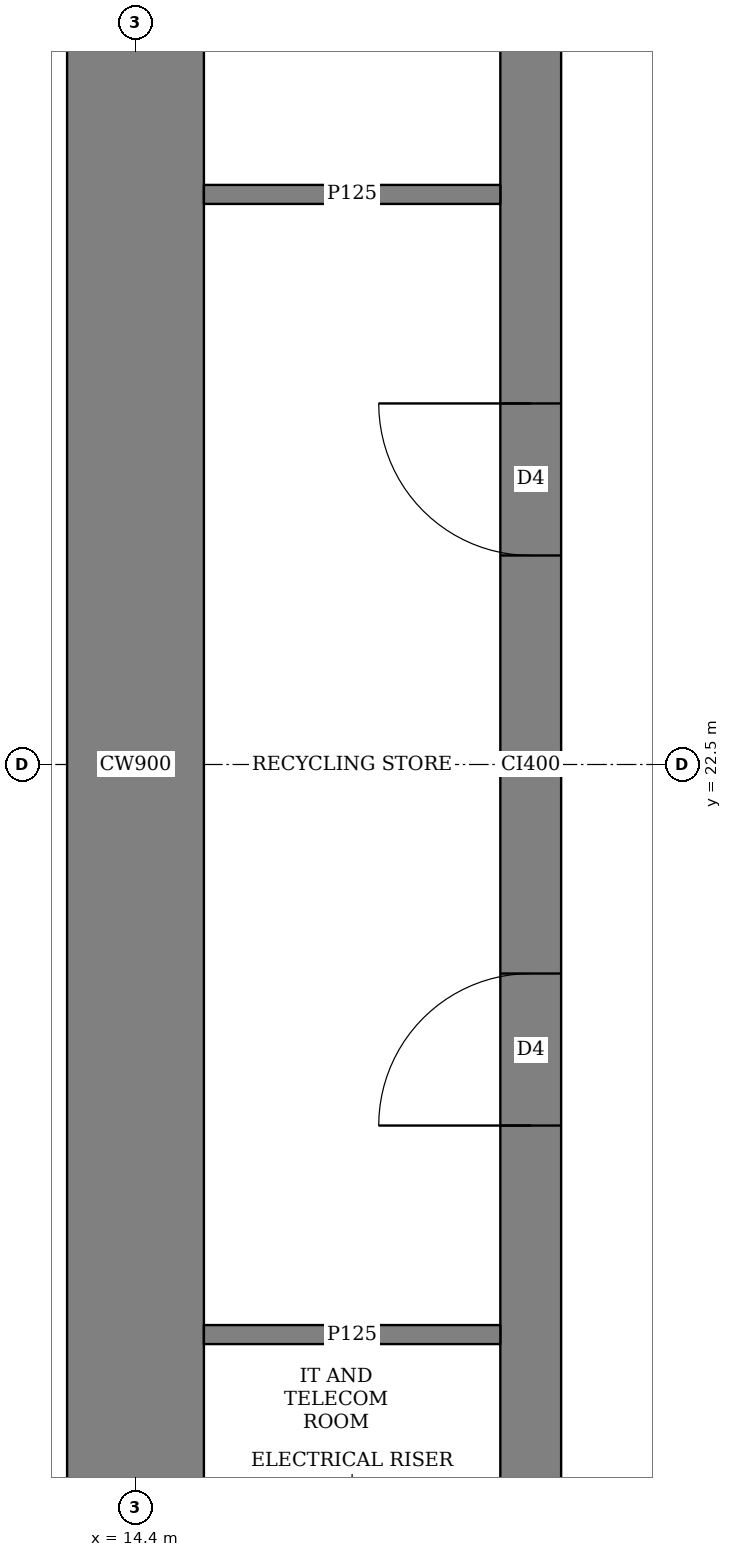
"""IFC4 building model, lengths in metres.
Left out: names, types, materials, properties, quantities, classifications, styles, units other than length and angle.
Written with IfcOpenShell. Run it as: python <this file> out.ifc"""

import sys

from ifc_helpers import new_model, si_unit, direction, frame, frame_2d, origin, place, context, subcontext, project, spatial, rectangle, extrude, element, fill, save


model = new_model("IFC4")
c1 = context("Model", 3, precision=1e-05, world=origin(), true_north=direction((0.0, 1.0)))
c2 = subcontext(c1, "Body", "Model", "MODEL_VIEW")
j1 = project(units=[si_unit("LENGTHUNIT", "METRE"), si_unit("PLANEANGLEUNIT", "RADIAN")], contexts=[c1])
p1 = place(None, origin())
s1 = spatial("IfcSite", under=j1, at=p1, CompositionType="ELEMENT")
p2 = place(p1, origin())
s2 = spatial("IfcBuilding", under=s1, at=p2, CompositionType="ELEMENT")
p3 = place(p2, frame((0.0, 0.0, 285.35)))
s3 = spatial("IfcBuildingStorey", under=s2, at=p3, CompositionType="ELEMENT", Elevation=285.35)
p4 = place(p3, frame((14.4, 15.45, 0.0), z_axis=(0.0, 0.0, 1.0), x_axis=(0.0, 1.0, 0.0)))
e1 = element("IfcWall", 1, at=p4, inside=s3, PredefinedType="SHEAR", context=c2, shape_type="SweptSolid", body=[
    extrude(rectangle(XDim=14.1, YDim=0.9, at=frame_2d((7.05, 0.0))), origin(), (0.0, 0.0, 1.0), 3.75),
])
p5 = place(p3, frame((17.0, 15.45, 0.0), z_axis=(0.0, 0.0, 1.0), x_axis=(0.0, 1.0, 0.0)))
e2 = element("IfcWall", 2, at=p5, inside=s3, PredefinedType="SHEAR", context=c2, shape_type="SweptSolid", body=[
    extrude(rectangle(XDim=14.1, YDim=0.4, at=frame_2d((7.05, 0.0))), origin(), (0.0, 0.0, 1.0), 3.75),
])
p6 = place(p5, frame((1.05, 0.0, 0.0)))
e3 = element("IfcOpeningElement", 3, at=p6, cuts=e2, PredefinedType="OPENING", context=c2, shape_type="SweptSolid", body=[
    extrude(rectangle(XDim=1.0, YDim=2.1, at=frame_2d((0.5, 1.05))), frame((0.0, 0.21, 0.0), z_axis=(0.0, -1.0, 0.0), x_axis=(1.0, 0.0, 0.0)), (0.0, 0.0, 1.0), 0.42),
])
p7 = place(p5, frame((4.675, 0.0, 0.0)))
e4 = element("IfcOpeningElement", 4, at=p7, cuts=e2, PredefinedType="OPENING", context=c2, shape_type="SweptSolid", body=[
    extrude(rectangle(XDim=1.0, YDim=2.1, at=frame_2d((0.5, 1.05))), frame((0.0, 0.21, 0.0), z_axis=(0.0, -1.0, 0.0), x_axis=(1.0, 0.0, 0.0)), (0.0, 0.0, 1.0), 0.42),
])
p8 = place(p5, frame((8.425, 0.0, 0.0)))
e5 = element("IfcOpeningElement", 5, at=p8, cuts=e2, PredefinedType="OPENING", context=c2, shape_type="SweptSolid", body=[
    extrude(rectangle(XDim=1.0, YDim=2.1, at=frame_2d((0.5, 1.05))), frame((0.0, 0.21, 0.0), z_axis=(0.0, -1.0, 0.0), x_axis=(1.0, 0.0, 0.0)), (0.0, 0.0, 1.0), 0.42),
])
p9 = place(p5, frame((12.175, 0.0, 0.0)))
e6 = element("IfcOpeningElement", 6, at=p9, cuts=e2, PredefinedType="OPENING", context=c2, shape_type="SweptSolid", body=[
    extrude(rectangle(XDim=1.0, YDim=2.1, at=frame_2d((0.5, 1.05))), frame((0.0, 0.21, 0.0), z_axis=(0.0, -1.0, 0.0), x_axis=(1.0, 0.0, 0.0)), (0.0, 0.0, 1.0), 0.42),
])
for number, where, z_axis, x_axis in (
    (7, (14.85, 18.75, 0.0), (0.0, 0.0, 1.0), (1.0, 0.0, 0.0)),
    (8, (14.85, 26.25, 0.0), (0.0, 0.0, 1.0), (1.0, 0.0, 0.0)),
):
    element("IfcWall", number, at=place(p3, frame(where, z_axis=z_axis, x_axis=x_axis)), inside=s3, PredefinedType="PARTITIONING", context=c2, shape_type="SweptSolid", body=[
        extrude(rectangle(XDim=1.95, YDim=0.125, at=frame_2d((0.975, 0.0))), origin(), (0.0, 0.0, 1.0), 3.5),
    ])
p10 = place(p7, origin())
e9 = element("IfcDoor", 9, at=p10, inside=s3, OperationType="SINGLE_SWING_LEFT", PredefinedType="DOOR", context=c2, shape_type="SweptSolid", body=[
    extrude(rectangle(XDim=1.0, YDim=2.1, at=frame_2d((0.5, 1.05))), frame((0.0, 0.025, 0.0), z_axis=(0.0, -1.0, 0.0), x_axis=(1.0, 0.0, 0.0)), (0.0, 0.0, 1.0), 0.05),
])
fill(e4, e9)
p11 = place(p8, origin())
e10 = element("IfcDoor", 10, at=p11, inside=s3, OperationType="SINGLE_SWING_RIGHT", PredefinedType="DOOR", context=c2, shape_type="SweptSolid", body=[
    extrude(rectangle(XDim=1.0, YDim=2.1, at=frame_2d((0.5, 1.05))), frame((0.0, 0.025, 0.0), z_axis=(0.0, -1.0, 0.0), x_axis=(1.0, 0.0, 0.0)), (0.0, 0.0, 1.0), 0.05),
])
fill(e5, e10)
save(model, sys.argv[1])
